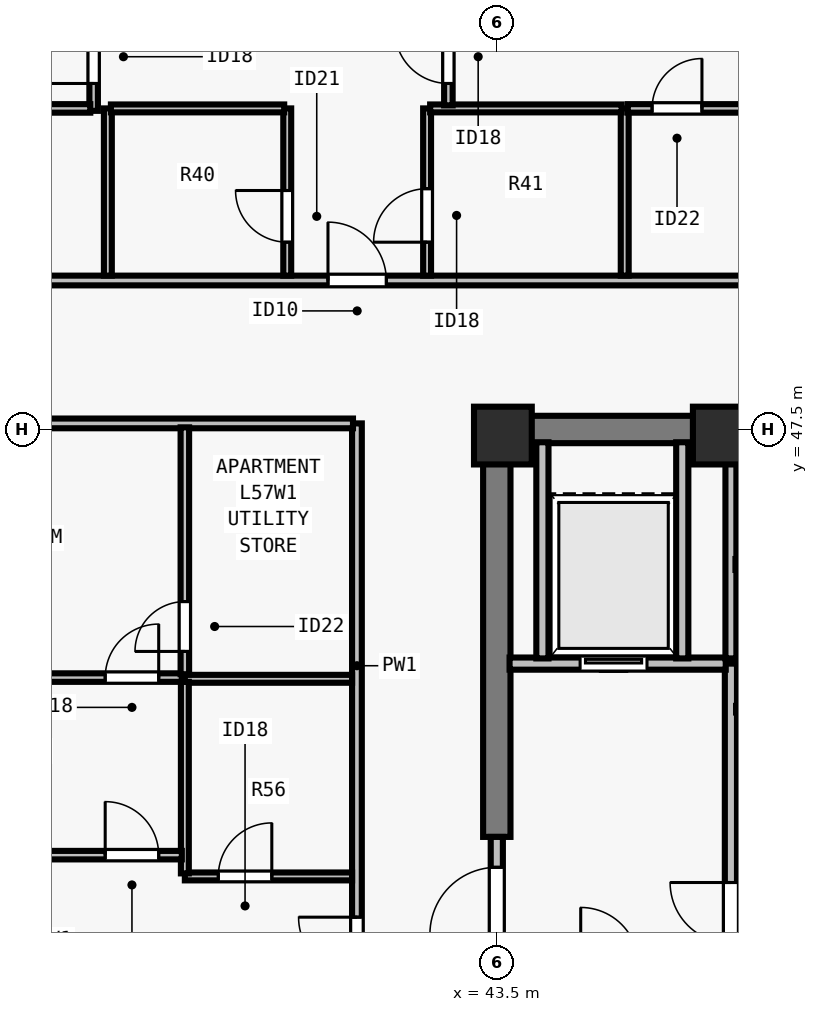
"""IFC4 building model, lengths in metres.
Left out: names, types, materials, properties, quantities, classifications, styles, units other than length and angle.
Written with IfcOpenShell. Run it as: python <this file> out.ifc"""

import sys

from ifc_helpers import new_model, si_unit, direction, frame, frame_2d, origin, origin_2d, place, context, subcontext, project, spatial, rectangle, extrude, element, fill, save


model = new_model("IFC4")
c1 = context("Model", 3, precision=1e-05, world=origin(), true_north=direction((0.0, 1.0)))
c2 = subcontext(c1, "Body", "Model", "MODEL_VIEW")
j1 = project(units=[si_unit("LENGTHUNIT", "METRE"), si_unit("PLANEANGLEUNIT", "RADIAN")], contexts=[c1])
p1 = place(None, origin())
s1 = spatial("IfcSite", under=j1, at=p1, CompositionType="ELEMENT")
p2 = place(p1, origin())
s2 = spatial("IfcBuilding", under=s1, at=p2, CompositionType="ELEMENT")
p3 = place(p2, frame((0.0, 0.0, 209.5)))
s3 = spatial("IfcBuildingStorey", under=s2, at=p3, CompositionType="ELEMENT", Elevation=209.5)
for number, where, z_axis, x_axis in (
    (1, (43.6, 47.4, 0.0), (0.0, 0.0, 1.0), (1.0, 0.0, 0.0)),
    (2, (47.2, 47.4, 0.0), (0.0, 0.0, 1.0), (1.0, 0.0, 0.0)),
):
    element("IfcColumn", number, at=place(p3, frame(where, z_axis=z_axis, x_axis=x_axis)), inside=s3, PredefinedType="COLUMN", context=c2, shape_type="SweptSolid", body=[
        extrude(rectangle(XDim=0.95, YDim=0.95, at=origin_2d()), origin(), (0.0, 0.0, 1.0), 3.5),
    ])
p4 = place(p3, frame((43.275, 47.5, 0.0), z_axis=(0.0, 0.0, 1.0), x_axis=(1.0, 0.0, 0.0)))
e3 = element("IfcWall", 3, at=p4, inside=s3, PredefinedType="SHEAR", context=c2, shape_type="SweptSolid", body=[
    extrude(rectangle(XDim=17.45, YDim=0.45, at=frame_2d((8.725, 0.0))), origin(), (0.0, 0.0, 1.0), 3.29),
])
p5 = place(p3, frame((43.5, 40.8, 0.0), z_axis=(0.0, 0.0, 1.0), x_axis=(0.0, 1.0, 0.0)))
e4 = element("IfcWall", 4, at=p5, inside=s3, PredefinedType="SHEAR", context=c2, shape_type="SweptSolid", body=[
    extrude(rectangle(XDim=6.485, YDim=0.45, at=frame_2d((3.242, 0.0))), origin(), (0.0, 0.0, 1.0), 3.29),
])
p6 = place(p3, frame((47.35, 40.5, 0.0), z_axis=(0.0, 0.0, 1.0), x_axis=(1.0, 0.0, 0.0)))
e5 = element("IfcWall", 5, at=p6, inside=s3, PredefinedType="SOLIDWALL", context=c2, shape_type="SweptSolid", body=[
    extrude(rectangle(XDim=2.95, YDim=0.2, at=frame_2d((1.475, 0.0))), origin(), (0.0, 0.0, 1.0), 3.29),
])
p7 = place(p3, frame((43.5, 38.75, 0.0), z_axis=(0.0, 0.0, 1.0), x_axis=(0.0, 1.0, 0.0)))
e6 = element("IfcWall", 6, at=p7, inside=s3, PredefinedType="SOLIDWALL", context=c2, shape_type="SweptSolid", body=[
    extrude(rectangle(XDim=2.05, YDim=0.2, at=frame_2d((1.025, 0.0))), origin(), (0.0, 0.0, 1.0), 3.29),
])
p8 = place(p7, frame((0.45, 0.0, 0.0)))
e7 = element("IfcOpeningElement", 7, at=p8, cuts=e6, PredefinedType="OPENING", context=c2, shape_type="SweptSolid", body=[
    extrude(rectangle(XDim=1.1, YDim=2.15, at=frame_2d((0.55, 1.075))), frame((0.0, 0.11, 0.0), z_axis=(0.0, -1.0, 0.0), x_axis=(1.0, 0.0, 0.0)), (0.0, 0.0, 1.0), 0.22),
])
p9 = place(p3, frame((47.35, 38.785, 0.0), z_axis=(0.0, 0.0, 1.0), x_axis=(0.0, 1.0, 0.0)))
e8 = element("IfcWall", 8, at=p9, inside=s3, PredefinedType="SOLIDWALL", context=c2, shape_type="SweptSolid", body=[
    extrude(rectangle(XDim=4.865, YDim=0.2, at=frame_2d((2.433, 0.0))), origin(), (0.0, 0.0, 1.0), 3.29),
])
p10 = place(p9, frame((0.265, 0.0, 0.0)))
e9 = element("IfcOpeningElement", 9, at=p10, cuts=e8, PredefinedType="OPENING", context=c2, shape_type="SweptSolid", body=[
    extrude(rectangle(XDim=1.0, YDim=2.15, at=frame_2d((0.5, 1.075))), frame((0.0, 0.11, 0.0), z_axis=(0.0, -1.0, 0.0), x_axis=(1.0, 0.0, 0.0)), (0.0, 0.0, 1.0), 0.22),
])
p11 = place(p3, frame((43.71, 43.65, 0.0), z_axis=(0.0, 0.0, 1.0), x_axis=(1.0, 0.0, 0.0)))
e10 = element("IfcWall", 10, at=p11, inside=s3, PredefinedType="SOLIDWALL", context=c2, shape_type="SweptSolid", body=[
    extrude(rectangle(XDim=3.555, YDim=0.2, at=frame_2d((1.777, 0.0))), origin(), (0.0, 0.0, 1.0), 3.29),
])
p12 = place(p11, frame((1.16, 0.0, 0.0)))
e11 = element("IfcOpeningElement", 11, at=p12, cuts=e10, PredefinedType="OPENING", context=c2, shape_type="SweptSolid", body=[
    extrude(rectangle(XDim=1.1, YDim=2.2, at=frame_2d((0.55, 1.1))), frame((0.0, 0.11, 0.0), z_axis=(0.0, -1.0, 0.0), x_axis=(1.0, 0.0, 0.0)), (0.0, 0.0, 1.0), 0.22),
])
for number, where, z_axis, x_axis in (
    (12, (46.55, 43.735, 0.0), (0.0, 0.0, 1.0), (0.0, 1.0, 0.0)),
    (13, (44.25, 43.735, 0.0), (0.0, 0.0, 1.0), (0.0, 1.0, 0.0)),
):
    element("IfcWall", number, at=place(p3, frame(where, z_axis=z_axis, x_axis=x_axis)), inside=s3, PredefinedType="SOLIDWALL", context=c2, shape_type="SweptSolid", body=[
        extrude(rectangle(XDim=3.555, YDim=0.2, at=frame_2d((1.777, 0.0))), origin(), (0.0, 0.0, 1.0), 3.29),
    ])
p13 = place(p3, frame((47.35, 43.735, 0.0), z_axis=(0.0, 0.0, 1.0), x_axis=(0.0, 1.0, 0.0)))
e14 = element("IfcWall", 14, at=p13, inside=s3, PredefinedType="SOLIDWALL", context=c2, shape_type="SweptSolid", body=[
    extrude(rectangle(XDim=3.555, YDim=0.18, at=frame_2d((1.777, 0.0))), origin(), (0.0, 0.0, 1.0), 3.29),
])
p14 = place(p3, frame((47.435, 42.9, 0.0), z_axis=(0.0, 0.0, 1.0), x_axis=(1.0, 0.0, 0.0)))
e15 = element("IfcWall", 15, at=p14, inside=s3, PredefinedType="PARTITIONING", context=c2, shape_type="SweptSolid", body=[
    extrude(rectangle(XDim=2.78, YDim=0.11, at=frame_2d((1.39, 0.0))), origin(), (0.0, 0.0, 1.0), 3.29),
])
p15 = place(p3, frame((47.425, 45.28, 0.0), z_axis=(0.0, 0.0, 1.0), x_axis=(1.0, 0.0, 0.0)))
e16 = element("IfcWall", 16, at=p15, inside=s3, PredefinedType="SOLIDWALL", context=c2, shape_type="SweptSolid", body=[
    extrude(rectangle(XDim=2.79, YDim=0.18, at=frame_2d((1.395, 0.0))), origin(), (0.0, 0.0, 1.0), 3.29),
])
p16 = place(p3, frame((29.805, 49.95, 0.0), z_axis=(0.0, 0.0, 1.0), x_axis=(1.0, 0.0, 0.0)))
e17 = element("IfcWall", 17, at=p16, inside=s3, PredefinedType="PARTITIONING", context=c2, shape_type="SweptSolid", body=[
    extrude(rectangle(XDim=44.39, YDim=0.16, at=frame_2d((22.195, 0.0))), origin(), (0.0, 0.0, 1.0), 2.958),
])
p17 = place(p16, frame((10.919, 0.0, 0.0)))
e18 = element("IfcOpeningElement", 18, at=p17, cuts=e17, PredefinedType="OPENING", context=c2, shape_type="SweptSolid", body=[
    extrude(rectangle(XDim=0.96, YDim=2.18, at=frame_2d((0.48, 1.09))), frame((0.0, 0.09, 0.0), z_axis=(0.0, -1.0, 0.0), x_axis=(1.0, 0.0, 0.0)), (0.0, 0.0, 1.0), 0.18),
])
p18 = place(p16, frame((32.999, 0.0, 0.0)))
e19 = element("IfcOpeningElement", 19, at=p18, cuts=e17, PredefinedType="OPENING", context=c2, shape_type="SweptSolid", body=[
    extrude(rectangle(XDim=0.96, YDim=2.18, at=frame_2d((0.48, 1.09))), frame((0.0, 0.09, 0.0), z_axis=(0.0, -1.0, 0.0), x_axis=(1.0, 0.0, 0.0)), (0.0, 0.0, 1.0), 0.18),
])
p19 = place(p3, frame((41.2, 30.4, 0.0), z_axis=(0.0, 0.0, 1.0), x_axis=(0.0, 1.0, 0.0)))
e20 = element("IfcWall", 20, at=p19, inside=s3, PredefinedType="PARTITIONING", context=c2, shape_type="SweptSolid", body=[
    extrude(rectangle(XDim=17.2, YDim=0.16, at=frame_2d((8.6, 0.0))), origin(), (0.0, 0.0, 1.0), 3.29),
])
p20 = place(p19, frame((8.12, 0.0, 0.0)))
e21 = element("IfcOpeningElement", 21, at=p20, cuts=e20, PredefinedType="OPENING", context=c2, shape_type="SweptSolid", body=[
    extrude(rectangle(XDim=0.96, YDim=2.18, at=frame_2d((0.48, 1.09))), frame((0.0, 0.09, 0.0), z_axis=(0.0, -1.0, 0.0), x_axis=(1.0, 0.0, 0.0)), (0.0, 0.0, 1.0), 0.18),
])
p21 = place(p3, frame((29.805, 47.6, 0.0), z_axis=(0.0, 0.0, 1.0), x_axis=(1.0, 0.0, 0.0)))
e22 = element("IfcWall", 22, at=p21, inside=s3, PredefinedType="PARTITIONING", context=c2, shape_type="SweptSolid", body=[
    extrude(rectangle(XDim=11.33, YDim=0.16, at=frame_2d((5.665, 0.0))), origin(), (0.0, 0.0, 1.0), 3.29),
])
p22 = place(p3, frame((37.104, 50.03, 0.0), z_axis=(0.0, 0.0, 1.0), x_axis=(0.0, 1.0, 0.0)))
e23 = element("IfcWall", 23, at=p22, inside=s3, PredefinedType="PLUMBINGWALL", context=c2, shape_type="SweptSolid", body=[
    extrude(rectangle(XDim=2.75, YDim=0.13, at=frame_2d((1.375, 0.0))), origin(), (0.0, 0.0, 1.0), 3.29),
])
p23 = place(p3, frame((40.054, 50.03, 0.0), z_axis=(0.0, 0.0, 1.0), x_axis=(0.0, 1.0, 0.0)))
e24 = element("IfcWall", 24, at=p23, inside=s3, PredefinedType="PLUMBINGWALL", context=c2, shape_type="SweptSolid", body=[
    extrude(rectangle(XDim=2.75, YDim=0.13, at=frame_2d((1.375, 0.0))), origin(), (0.0, 0.0, 1.0), 2.573),
])
p24 = place(p23, frame((0.55, 0.0, 0.0)))
e25 = element("IfcOpeningElement", 25, at=p24, cuts=e24, PredefinedType="OPENING", context=c2, shape_type="SweptSolid", body=[
    extrude(rectangle(XDim=0.85, YDim=2.08, at=frame_2d((0.425, 1.04))), frame((0.0, 0.075, 0.0), z_axis=(0.0, -1.0, 0.0), x_axis=(1.0, 0.0, 0.0)), (0.0, 0.0, 1.0), 0.15),
])
p25 = place(p3, frame((37.154, 52.78, 0.0), z_axis=(0.0, 0.0, 1.0), x_axis=(1.0, 0.0, 0.0)))
e26 = element("IfcWall", 26, at=p25, inside=s3, PredefinedType="PLUMBINGWALL", context=c2, shape_type="SweptSolid", body=[
    extrude(rectangle(XDim=2.85, YDim=0.13, at=frame_2d((1.425, 0.0))), origin(), (0.0, 0.0, 1.0), 3.29),
])
p26 = place(p3, frame((45.604, 50.03, 0.0), z_axis=(0.0, 0.0, 1.0), x_axis=(0.0, 1.0, 0.0)))
e27 = element("IfcWall", 27, at=p26, inside=s3, PredefinedType="PLUMBINGWALL", context=c2, shape_type="SweptSolid", body=[
    extrude(rectangle(XDim=2.75, YDim=0.13, at=frame_2d((1.375, 0.0))), origin(), (0.0, 0.0, 1.0), 3.29),
])
p27 = place(p3, frame((42.354, 50.03, 0.0), z_axis=(0.0, 0.0, 1.0), x_axis=(0.0, 1.0, 0.0)))
e28 = element("IfcWall", 28, at=p27, inside=s3, PredefinedType="PLUMBINGWALL", context=c2, shape_type="SweptSolid", body=[
    extrude(rectangle(XDim=2.75, YDim=0.13, at=frame_2d((1.375, 0.0))), origin(), (0.0, 0.0, 1.0), 3.29),
])
p28 = place(p27, frame((0.55, 0.0, 0.0)))
e29 = element("IfcOpeningElement", 29, at=p28, cuts=e28, PredefinedType="OPENING", context=c2, shape_type="SweptSolid", body=[
    extrude(rectangle(XDim=0.88, YDim=2.1, at=frame_2d((0.44, 1.05))), frame((0.0, 0.075, 0.0), z_axis=(0.0, -1.0, 0.0), x_axis=(1.0, 0.0, 0.0)), (0.0, 0.0, 1.0), 0.15),
])
p29 = place(p3, frame((42.404, 52.78, 0.0), z_axis=(0.0, 0.0, 1.0), x_axis=(1.0, 0.0, 0.0)))
e30 = element("IfcWall", 30, at=p29, inside=s3, PredefinedType="PLUMBINGWALL", context=c2, shape_type="SweptSolid", body=[
    extrude(rectangle(XDim=3.15, YDim=0.13, at=frame_2d((1.575, 0.0))), origin(), (0.0, 0.0, 1.0), 3.29),
])
p30 = place(p3, frame((36.87, 52.74, 0.0), z_axis=(0.0, 0.0, 1.0), x_axis=(0.0, 1.0, 0.0)))
e31 = element("IfcWall", 31, at=p30, inside=s3, PredefinedType="PARTITIONING", context=c2, shape_type="SweptSolid", body=[
    extrude(rectangle(XDim=8.38, YDim=0.14, at=frame_2d((4.19, 0.0))), origin(), (0.0, 0.0, 1.0), 2.573),
])
p31 = place(p30, frame((0.45, 0.0, 0.0)))
e32 = element("IfcOpeningElement", 32, at=p31, cuts=e31, PredefinedType="OPENING", context=c2, shape_type="SweptSolid", body=[
    extrude(rectangle(XDim=0.88, YDim=2.1, at=frame_2d((0.44, 1.05))), frame((0.0, 0.08, 0.0), z_axis=(0.0, -1.0, 0.0), x_axis=(1.0, 0.0, 0.0)), (0.0, 0.0, 1.0), 0.16),
])
p32 = place(p3, frame((29.87, 52.78, 0.0), z_axis=(0.0, 0.0, 1.0), x_axis=(1.0, 0.0, 0.0)))
e33 = element("IfcWall", 33, at=p32, inside=s3, PredefinedType="PARTITIONING", context=c2, shape_type="SweptSolid", body=[
    extrude(rectangle(XDim=6.945, YDim=0.14, at=frame_2d((3.472, 0.0))), origin(), (0.0, 0.0, 1.0), 2.958),
])
p33 = place(p32, frame((0.45, 0.0, 0.0)))
e34 = element("IfcOpeningElement", 34, at=p33, cuts=e33, PredefinedType="OPENING", context=c2, shape_type="SweptSolid", body=[
    extrude(rectangle(XDim=0.82, YDim=2.1, at=frame_2d((0.41, 1.05))), frame((0.0, 0.08, 0.0), z_axis=(0.0, -1.0, 0.0), x_axis=(1.0, 0.0, 0.0)), (0.0, 0.0, 1.0), 0.16),
])
p34 = place(p3, frame((45.654, 52.78, 0.0), z_axis=(0.0, 0.0, 1.0), x_axis=(1.0, 0.0, 0.0)))
e35 = element("IfcWall", 35, at=p34, inside=s3, PredefinedType="PARTITIONING", context=c2, shape_type="SweptSolid", body=[
    extrude(rectangle(XDim=6.884, YDim=0.14, at=frame_2d((3.442, 0.0))), origin(), (0.0, 0.0, 1.0), 3.29),
])
p35 = place(p34, frame((0.4, 0.0, 0.0)))
e36 = element("IfcOpeningElement", 36, at=p35, cuts=e35, PredefinedType="OPENING", context=c2, shape_type="SweptSolid", body=[
    extrude(rectangle(XDim=0.82, YDim=2.1, at=frame_2d((0.41, 1.05))), frame((0.0, 0.08, 0.0), z_axis=(0.0, -1.0, 0.0), x_axis=(1.0, 0.0, 0.0)), (0.0, 0.0, 1.0), 0.16),
])
p36 = place(p3, frame((42.704, 52.83, 0.0), z_axis=(0.0, 0.0, 1.0), x_axis=(0.0, 1.0, 0.0)))
e37 = element("IfcWall", 37, at=p36, inside=s3, PredefinedType="PARTITIONING", context=c2, shape_type="SweptSolid", body=[
    extrude(rectangle(XDim=8.29, YDim=0.14, at=frame_2d((4.145, 0.0))), origin(), (0.0, 0.0, 1.0), 3.29),
])
p37 = place(p36, frame((0.36, 0.0, 0.0)))
e38 = element("IfcOpeningElement", 38, at=p37, cuts=e37, PredefinedType="OPENING", context=c2, shape_type="SweptSolid", body=[
    extrude(rectangle(XDim=0.88, YDim=2.1, at=frame_2d((0.44, 1.05))), frame((0.0, 0.08, 0.0), z_axis=(0.0, -1.0, 0.0), x_axis=(1.0, 0.0, 0.0)), (0.0, 0.0, 1.0), 0.16),
])
p38 = place(p3, frame((38.37, 43.4, 0.0), z_axis=(0.0, 0.0, 1.0), x_axis=(1.0, 0.0, 0.0)))
e39 = element("IfcWall", 39, at=p38, inside=s3, PredefinedType="PLUMBINGWALL", context=c2, shape_type="SweptSolid", body=[
    extrude(rectangle(XDim=2.75, YDim=0.13, at=frame_2d((1.375, 0.0))), origin(), (0.0, 0.0, 1.0), 2.958),
])
p39 = place(p3, frame((38.37, 40.15, 0.0), z_axis=(0.0, 0.0, 1.0), x_axis=(1.0, 0.0, 0.0)))
e40 = element("IfcWall", 40, at=p39, inside=s3, PredefinedType="PLUMBINGWALL", context=c2, shape_type="SweptSolid", body=[
    extrude(rectangle(XDim=2.75, YDim=0.13, at=frame_2d((1.375, 0.0))), origin(), (0.0, 0.0, 1.0), 3.29),
])
p40 = place(p39, frame((0.55, 0.0, 0.0)))
e41 = element("IfcOpeningElement", 41, at=p40, cuts=e40, PredefinedType="OPENING", context=c2, shape_type="SweptSolid", body=[
    extrude(rectangle(XDim=0.88, YDim=2.1, at=frame_2d((0.44, 1.05))), frame((0.0, 0.075, 0.0), z_axis=(0.0, -1.0, 0.0), x_axis=(1.0, 0.0, 0.0)), (0.0, 0.0, 1.0), 0.15),
])
p41 = place(p3, frame((38.37, 40.2, 0.0), z_axis=(0.0, 0.0, 1.0), x_axis=(0.0, 1.0, 0.0)))
e42 = element("IfcWall", 42, at=p41, inside=s3, PredefinedType="PLUMBINGWALL", context=c2, shape_type="SweptSolid", body=[
    extrude(rectangle(XDim=3.15, YDim=0.13, at=frame_2d((1.575, 0.0))), origin(), (0.0, 0.0, 1.0), 3.29),
])
p42 = place(p3, frame((29.88, 43.42, 0.0), z_axis=(0.0, 0.0, 1.0), x_axis=(1.0, 0.0, 0.0)))
e43 = element("IfcWall", 43, at=p42, inside=s3, PredefinedType="PARTITIONING", context=c2, shape_type="SweptSolid", body=[
    extrude(rectangle(XDim=8.44, YDim=0.14, at=frame_2d((4.22, 0.0))), origin(), (0.0, 0.0, 1.0), 3.29),
])
p43 = place(p42, frame((7.18, 0.0, 0.0)))
e44 = element("IfcOpeningElement", 44, at=p43, cuts=e43, PredefinedType="OPENING", context=c2, shape_type="SweptSolid", body=[
    extrude(rectangle(XDim=0.88, YDim=2.1, at=frame_2d((0.44, 1.05))), frame((0.0, 0.08, 0.0), z_axis=(0.0, -1.0, 0.0), x_axis=(1.0, 0.0, 0.0)), (0.0, 0.0, 1.0), 0.16),
])
p44 = place(p3, frame((38.37, 43.475, 0.0), z_axis=(0.0, 0.0, 1.0), x_axis=(0.0, 1.0, 0.0)))
e45 = element("IfcWall", 45, at=p44, inside=s3, PredefinedType="PARTITIONING", context=c2, shape_type="SweptSolid", body=[
    extrude(rectangle(XDim=4.06, YDim=0.14, at=frame_2d((2.03, 0.0))), origin(), (0.0, 0.0, 1.0), 3.29),
])
p45 = place(p44, frame((0.375, 0.0, 0.0)))
e46 = element("IfcOpeningElement", 46, at=p45, cuts=e45, PredefinedType="OPENING", context=c2, shape_type="SweptSolid", body=[
    extrude(rectangle(XDim=0.82, YDim=2.1, at=frame_2d((0.41, 1.05))), frame((0.0, 0.08, 0.0), z_axis=(0.0, -1.0, 0.0), x_axis=(1.0, 0.0, 0.0)), (0.0, 0.0, 1.0), 0.16),
])
p46 = place(p3, frame((29.88, 40.5, 0.0), z_axis=(0.0, 0.0, 1.0), x_axis=(1.0, 0.0, 0.0)))
e47 = element("IfcWall", 47, at=p46, inside=s3, PredefinedType="PARTITIONING", context=c2, shape_type="SweptSolid", body=[
    extrude(rectangle(XDim=8.44, YDim=0.14, at=frame_2d((4.22, 0.0))), origin(), (0.0, 0.0, 1.0), 2.958),
])
p47 = place(p46, frame((7.18, 0.0, 0.0)))
e48 = element("IfcOpeningElement", 48, at=p47, cuts=e47, PredefinedType="OPENING", context=c2, shape_type="SweptSolid", body=[
    extrude(rectangle(XDim=0.88, YDim=2.1, at=frame_2d((0.44, 1.05))), frame((0.0, 0.08, 0.0), z_axis=(0.0, -1.0, 0.0), x_axis=(1.0, 0.0, 0.0)), (0.0, 0.0, 1.0), 0.16),
])
p48 = place(p8, origin())
e49 = element("IfcDoor", 49, at=p48, inside=s3, OperationType="SINGLE_SWING_LEFT", PredefinedType="DOOR", context=c2, shape_type="SweptSolid", body=[
    extrude(rectangle(XDim=1.1, YDim=2.15, at=frame_2d((0.55, 1.075))), frame((0.0, 0.025, 0.0), z_axis=(0.0, -1.0, 0.0), x_axis=(1.0, 0.0, 0.0)), (0.0, 0.0, 1.0), 0.05),
])
fill(e7, e49)
p49 = place(p10, origin())
e50 = element("IfcDoor", 50, at=p49, inside=s3, OperationType="SINGLE_SWING_RIGHT", PredefinedType="DOOR", context=c2, shape_type="SweptSolid", body=[
    extrude(rectangle(XDim=1.0, YDim=2.15, at=frame_2d((0.5, 1.075))), frame((0.0, 0.025, 0.0), z_axis=(0.0, -1.0, 0.0), x_axis=(1.0, 0.0, 0.0)), (0.0, 0.0, 1.0), 0.05),
])
fill(e9, e50)
p50 = place(p12, origin())
e51 = element("IfcDoor", 51, at=p50, inside=s3, OperationType="SLIDING_TO_LEFT", PredefinedType="DOOR", context=c2, shape_type="SweptSolid", body=[
    extrude(rectangle(XDim=1.1, YDim=2.2, at=frame_2d((0.55, 1.1))), frame((0.0, 0.025, 0.0), z_axis=(0.0, -1.0, 0.0), x_axis=(1.0, 0.0, 0.0)), (0.0, 0.0, 1.0), 0.05),
])
fill(e11, e51)
p51 = place(p24, origin())
e52 = element("IfcDoor", 52, at=p51, inside=s3, OperationType="SINGLE_SWING_RIGHT", PredefinedType="DOOR", context=c2, shape_type="SweptSolid", body=[
    extrude(rectangle(XDim=0.85, YDim=2.08, at=frame_2d((0.425, 1.04))), frame((0.0, 0.025, 0.0), z_axis=(0.0, -1.0, 0.0), x_axis=(1.0, 0.0, 0.0)), (0.0, 0.0, 1.0), 0.05),
])
fill(e25, e52)
p52 = place(p28, origin())
e53 = element("IfcDoor", 53, at=p52, inside=s3, OperationType="SINGLE_SWING_LEFT", PredefinedType="DOOR", context=c2, shape_type="SweptSolid", body=[
    extrude(rectangle(XDim=0.88, YDim=2.1, at=frame_2d((0.44, 1.05))), frame((0.0, 0.025, 0.0), z_axis=(0.0, -1.0, 0.0), x_axis=(1.0, 0.0, 0.0)), (0.0, 0.0, 1.0), 0.05),
])
fill(e29, e53)
p53 = place(p31, origin())
e54 = element("IfcDoor", 54, at=p53, inside=s3, OperationType="SINGLE_SWING_LEFT", PredefinedType="DOOR", context=c2, shape_type="SweptSolid", body=[
    extrude(rectangle(XDim=0.88, YDim=2.1, at=frame_2d((0.44, 1.05))), frame((0.0, 0.025, 0.0), z_axis=(0.0, -1.0, 0.0), x_axis=(1.0, 0.0, 0.0)), (0.0, 0.0, 1.0), 0.05),
])
fill(e32, e54)
p54 = place(p35, origin())
e55 = element("IfcDoor", 55, at=p54, inside=s3, OperationType="SINGLE_SWING_RIGHT", PredefinedType="DOOR", context=c2, shape_type="SweptSolid", body=[
    extrude(rectangle(XDim=0.82, YDim=2.1, at=frame_2d((0.41, 1.05))), frame((0.0, 0.025, 0.0), z_axis=(0.0, -1.0, 0.0), x_axis=(1.0, 0.0, 0.0)), (0.0, 0.0, 1.0), 0.05),
])
fill(e36, e55)
p55 = place(p37, origin())
e56 = element("IfcDoor", 56, at=p55, inside=s3, OperationType="SINGLE_SWING_RIGHT", PredefinedType="DOOR", context=c2, shape_type="SweptSolid", body=[
    extrude(rectangle(XDim=0.88, YDim=2.1, at=frame_2d((0.44, 1.05))), frame((0.0, 0.025, 0.0), z_axis=(0.0, -1.0, 0.0), x_axis=(1.0, 0.0, 0.0)), (0.0, 0.0, 1.0), 0.05),
])
fill(e38, e56)
p56 = place(p17, origin())
e57 = element("IfcDoor", 57, at=p56, inside=s3, OperationType="SINGLE_SWING_LEFT", PredefinedType="DOOR", context=c2, shape_type="SweptSolid", body=[
    extrude(rectangle(XDim=0.96, YDim=2.18, at=frame_2d((0.48, 1.09))), frame((0.0, 0.025, 0.0), z_axis=(0.0, -1.0, 0.0), x_axis=(1.0, 0.0, 0.0)), (0.0, 0.0, 1.0), 0.05),
])
fill(e18, e57)
p57 = place(p40, origin())
e58 = element("IfcDoor", 58, at=p57, inside=s3, OperationType="SINGLE_SWING_RIGHT", PredefinedType="DOOR", context=c2, shape_type="SweptSolid", body=[
    extrude(rectangle(XDim=0.88, YDim=2.1, at=frame_2d((0.44, 1.05))), frame((0.0, 0.025, 0.0), z_axis=(0.0, -1.0, 0.0), x_axis=(1.0, 0.0, 0.0)), (0.0, 0.0, 1.0), 0.05),
])
fill(e41, e58)
p58 = place(p45, origin())
e59 = element("IfcDoor", 59, at=p58, inside=s3, OperationType="SINGLE_SWING_LEFT", PredefinedType="DOOR", context=c2, shape_type="SweptSolid", body=[
    extrude(rectangle(XDim=0.82, YDim=2.1, at=frame_2d((0.41, 1.05))), frame((0.0, 0.025, 0.0), z_axis=(0.0, -1.0, 0.0), x_axis=(1.0, 0.0, 0.0)), (0.0, 0.0, 1.0), 0.05),
])
fill(e46, e59)
p59 = place(p43, origin())
e60 = element("IfcDoor", 60, at=p59, inside=s3, OperationType="SINGLE_SWING_RIGHT", PredefinedType="DOOR", context=c2, shape_type="SweptSolid", body=[
    extrude(rectangle(XDim=0.88, YDim=2.1, at=frame_2d((0.44, 1.05))), frame((0.0, 0.025, 0.0), z_axis=(0.0, -1.0, 0.0), x_axis=(1.0, 0.0, 0.0)), (0.0, 0.0, 1.0), 0.05),
])
fill(e44, e60)
p60 = place(p47, origin())
e61 = element("IfcDoor", 61, at=p60, inside=s3, OperationType="SINGLE_SWING_LEFT", PredefinedType="DOOR", context=c2, shape_type="SweptSolid", body=[
    extrude(rectangle(XDim=0.88, YDim=2.1, at=frame_2d((0.44, 1.05))), frame((0.0, 0.025, 0.0), z_axis=(0.0, -1.0, 0.0), x_axis=(1.0, 0.0, 0.0)), (0.0, 0.0, 1.0), 0.05),
])
fill(e48, e61)
p61 = place(p20, origin())
e62 = element("IfcDoor", 62, at=p61, inside=s3, OperationType="SINGLE_SWING_RIGHT", PredefinedType="DOOR", context=c2, shape_type="SweptSolid", body=[
    extrude(rectangle(XDim=0.96, YDim=2.18, at=frame_2d((0.48, 1.09))), frame((0.0, 0.025, 0.0), z_axis=(0.0, -1.0, 0.0), x_axis=(1.0, 0.0, 0.0)), (0.0, 0.0, 1.0), 0.05),
])
fill(e21, e62)
save(model, sys.argv[1])
